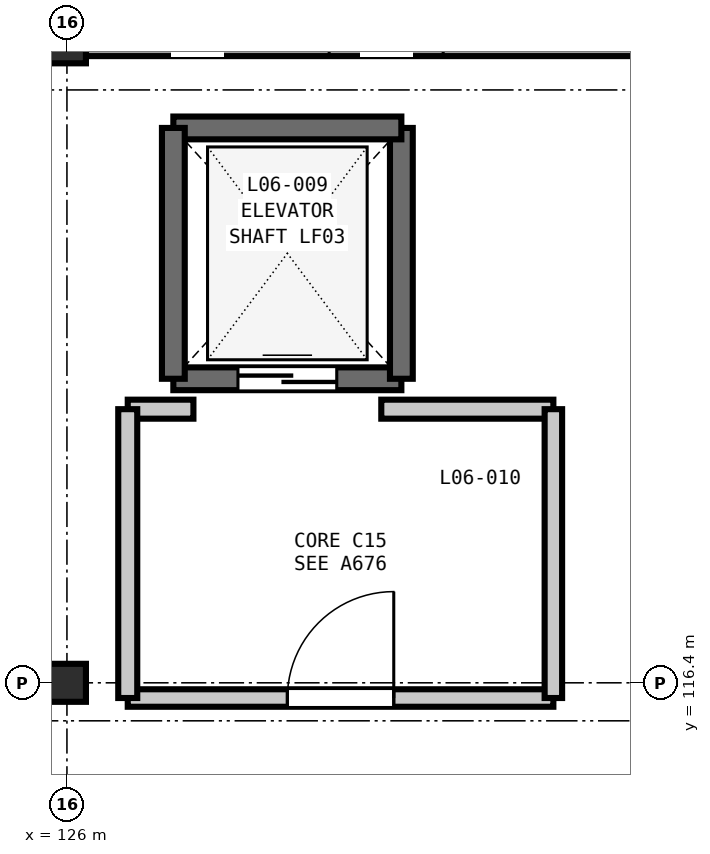
"""IFC4 building model, lengths in metres.
Left out: names, types, materials, properties, quantities, classifications, styles, units other than length and angle.
Written with IfcOpenShell. Run it as: python <this file> out.ifc"""

import sys

from ifc_helpers import new_model, si_unit, direction, frame, frame_2d, origin, origin_2d, place, context, subcontext, project, spatial, rectangle, extrude, element, fill, save


model = new_model("IFC4")
c1 = context("Model", 3, precision=1e-05, world=origin(), true_north=direction((0.0, 1.0)))
c2 = subcontext(c1, "Body", "Model", "MODEL_VIEW")
j1 = project(units=[si_unit("LENGTHUNIT", "METRE"), si_unit("PLANEANGLEUNIT", "RADIAN")], contexts=[c1])
p1 = place(None, origin())
s1 = spatial("IfcSite", under=j1, at=p1, CompositionType="ELEMENT")
p2 = place(p1, origin())
s2 = spatial("IfcBuilding", under=s1, at=p2, CompositionType="ELEMENT")
p3 = place(p2, frame((0.0, 0.0, 28.8)))
s3 = spatial("IfcBuildingStorey", under=s2, at=p3, CompositionType="ELEMENT", Elevation=28.8)
for number, where, z_axis, x_axis in (
    (1, (126.0, 116.4, 0.0), (0.0, 0.0, 1.0), (1.0, 0.0, 0.0)),
    (2, (126.0, 124.8, 0.0), (0.0, 0.0, 1.0), (1.0, 0.0, 0.0)),
):
    element("IfcColumn", number, at=place(p3, frame(where, z_axis=z_axis, x_axis=x_axis)), inside=s3, PredefinedType="COLUMN", context=c2, shape_type="SweptSolid", body=[
        extrude(rectangle(XDim=0.5, YDim=0.5, at=origin_2d()), origin(), (0.0, 0.0, 1.0), 4.2),
    ])
p4 = place(p3, frame((126.248, 124.8, 0.0), z_axis=(0.0, 0.0, 1.0), x_axis=(1.0, 0.0, 0.0)))
e3 = element("IfcWall", 3, at=p4, inside=s3, PredefinedType="SOLIDWALL", context=c2, shape_type="SweptSolid", body=[
    extrude(rectangle(XDim=7.904, YDim=0.31, at=frame_2d((3.952, 0.0))), origin(), (0.0, 0.0, 1.0), 3.48),
])
p5 = place(p4, frame((3.202, 0.0, 0.9)))
e4 = element("IfcOpeningElement", 4, at=p5, cuts=e3, PredefinedType="OPENING", context=c2, shape_type="SweptSolid", body=[
    extrude(rectangle(XDim=1.5, YDim=1.55, at=frame_2d((0.75, 0.775))), frame((0.0, 0.165, 0.0), z_axis=(0.0, -1.0, 0.0), x_axis=(1.0, 0.0, 0.0)), (0.0, 0.0, 1.0), 0.33),
])
p6 = place(p3, frame((127.4, 120.4, 0.0), z_axis=(0.0, 0.0, 1.0), x_axis=(1.0, 0.0, 0.0)))
e5 = element("IfcWall", 5, at=p6, inside=s3, PredefinedType="SHEAR", context=c2, shape_type="SweptSolid", body=[
    extrude(rectangle(XDim=3.0, YDim=0.3, at=frame_2d((1.5, 0.0))), origin(), (0.0, 0.0, 1.0), 4.2),
])
p7 = place(p6, frame((0.85, 0.0, 0.0)))
e6 = element("IfcOpeningElement", 6, at=p7, cuts=e5, PredefinedType="OPENING", context=c2, shape_type="SweptSolid", body=[
    extrude(rectangle(XDim=1.3, YDim=2.2, at=frame_2d((0.65, 1.1))), frame((0.0, 0.16, 0.0), z_axis=(0.0, -1.0, 0.0), x_axis=(1.0, 0.0, 0.0)), (0.0, 0.0, 1.0), 0.32),
])
p8 = place(p3, frame((130.4, 120.4, 0.0), z_axis=(0.0, 0.0, 1.0), x_axis=(0.0, 1.0, 0.0)))
e7 = element("IfcWall", 7, at=p8, inside=s3, PredefinedType="SHEAR", context=c2, shape_type="SweptSolid", body=[
    extrude(rectangle(XDim=3.3, YDim=0.3, at=frame_2d((1.65, 0.0))), origin(), (0.0, 0.0, 1.0), 4.2),
])
p9 = place(p3, frame((130.4, 123.7, 0.0), z_axis=(0.0, 0.0, 1.0), x_axis=(-1.0, 0.0, 0.0)))
e8 = element("IfcWall", 8, at=p9, inside=s3, PredefinedType="SHEAR", context=c2, shape_type="SweptSolid", body=[
    extrude(rectangle(XDim=3.0, YDim=0.3, at=frame_2d((1.5, 0.0))), origin(), (0.0, 0.0, 1.0), 4.2),
])
p10 = place(p3, frame((127.4, 123.7, 0.0), z_axis=(0.0, 0.0, 1.0), x_axis=(0.0, -1.0, 0.0)))
e9 = element("IfcWall", 9, at=p10, inside=s3, PredefinedType="SHEAR", context=c2, shape_type="SweptSolid", body=[
    extrude(rectangle(XDim=3.3, YDim=0.3, at=frame_2d((1.65, 0.0))), origin(), (0.0, 0.0, 1.0), 4.2),
])
p11 = place(p3, frame((126.8, 116.2, 0.0), z_axis=(0.0, 0.0, 1.0), x_axis=(1.0, 0.0, 0.0)))
e10 = element("IfcWall", 10, at=p11, inside=s3, PredefinedType="PARTITIONING", context=c2, shape_type="SweptSolid", body=[
    extrude(rectangle(XDim=5.6, YDim=0.23, at=frame_2d((2.8, 0.0))), origin(), (0.0, 0.0, 1.0), 3.635),
])
p12 = place(p11, frame((2.1, 0.0, 0.0)))
e11 = element("IfcOpeningElement", 11, at=p12, cuts=e10, PredefinedType="OPENING", context=c2, shape_type="SweptSolid", body=[
    extrude(rectangle(XDim=1.4, YDim=2.2, at=frame_2d((0.7, 1.1))), frame((0.0, 0.125, 0.0), z_axis=(0.0, -1.0, 0.0), x_axis=(1.0, 0.0, 0.0)), (0.0, 0.0, 1.0), 0.25),
])
p13 = place(p3, frame((130.136, 120.0, 0.0), z_axis=(0.0, 0.0, 1.0), x_axis=(1.0, 0.0, 0.0)))
e12 = element("IfcWall", 12, at=p13, inside=s3, PredefinedType="PARTITIONING", context=c2, shape_type="SweptSolid", body=[
    extrude(rectangle(XDim=2.264, YDim=0.25, at=frame_2d((1.132, 0.0))), origin(), (0.0, 0.0, 1.0), 3.92),
])
p14 = place(p3, frame((126.8, 120.0, 0.0), z_axis=(0.0, 0.0, 1.0), x_axis=(1.0, 0.0, 0.0)))
e13 = element("IfcWall", 13, at=p14, inside=s3, PredefinedType="PARTITIONING", context=c2, shape_type="SweptSolid", body=[
    extrude(rectangle(XDim=0.864, YDim=0.25, at=frame_2d((0.432, 0.0))), origin(), (0.0, 0.0, 1.0), 3.92),
])
p15 = place(p3, frame((126.8, 116.2, 0.0), z_axis=(0.0, 0.0, 1.0), x_axis=(0.0, 1.0, 0.0)))
e14 = element("IfcWall", 14, at=p15, inside=s3, PredefinedType="PARTITIONING", context=c2, shape_type="SweptSolid", body=[
    extrude(rectangle(XDim=3.8, YDim=0.25, at=frame_2d((1.9, 0.0))), origin(), (0.0, 0.0, 1.0), 3.92),
])
p16 = place(p3, frame((132.4, 116.2, 0.0), z_axis=(0.0, 0.0, 1.0), x_axis=(0.0, 1.0, 0.0)))
e15 = element("IfcWall", 15, at=p16, inside=s3, PredefinedType="PARTITIONING", context=c2, shape_type="SweptSolid", body=[
    extrude(rectangle(XDim=3.8, YDim=0.23, at=frame_2d((1.9, 0.0))), origin(), (0.0, 0.0, 1.0), 3.92),
])
p17 = place(p7, origin())
e16 = element("IfcDoor", 16, at=p17, inside=s3, OperationType="DOUBLE_DOOR_SLIDING", PredefinedType="DOOR", context=c2, shape_type="SweptSolid", body=[
    extrude(rectangle(XDim=1.3, YDim=2.2, at=frame_2d((0.65, 1.1))), frame((0.0, 0.025, 0.0), z_axis=(0.0, -1.0, 0.0), x_axis=(1.0, 0.0, 0.0)), (0.0, 0.0, 1.0), 0.05),
])
fill(e6, e16)
p18 = place(p12, origin())
e17 = element("IfcDoor", 17, at=p18, inside=s3, OperationType="SINGLE_SWING_RIGHT", PredefinedType="DOOR", context=c2, shape_type="SweptSolid", body=[
    extrude(rectangle(XDim=1.4, YDim=2.2, at=frame_2d((0.7, 1.1))), frame((0.0, 0.025, 0.0), z_axis=(0.0, -1.0, 0.0), x_axis=(1.0, 0.0, 0.0)), (0.0, 0.0, 1.0), 0.05),
])
fill(e11, e17)
save(model, sys.argv[1])
